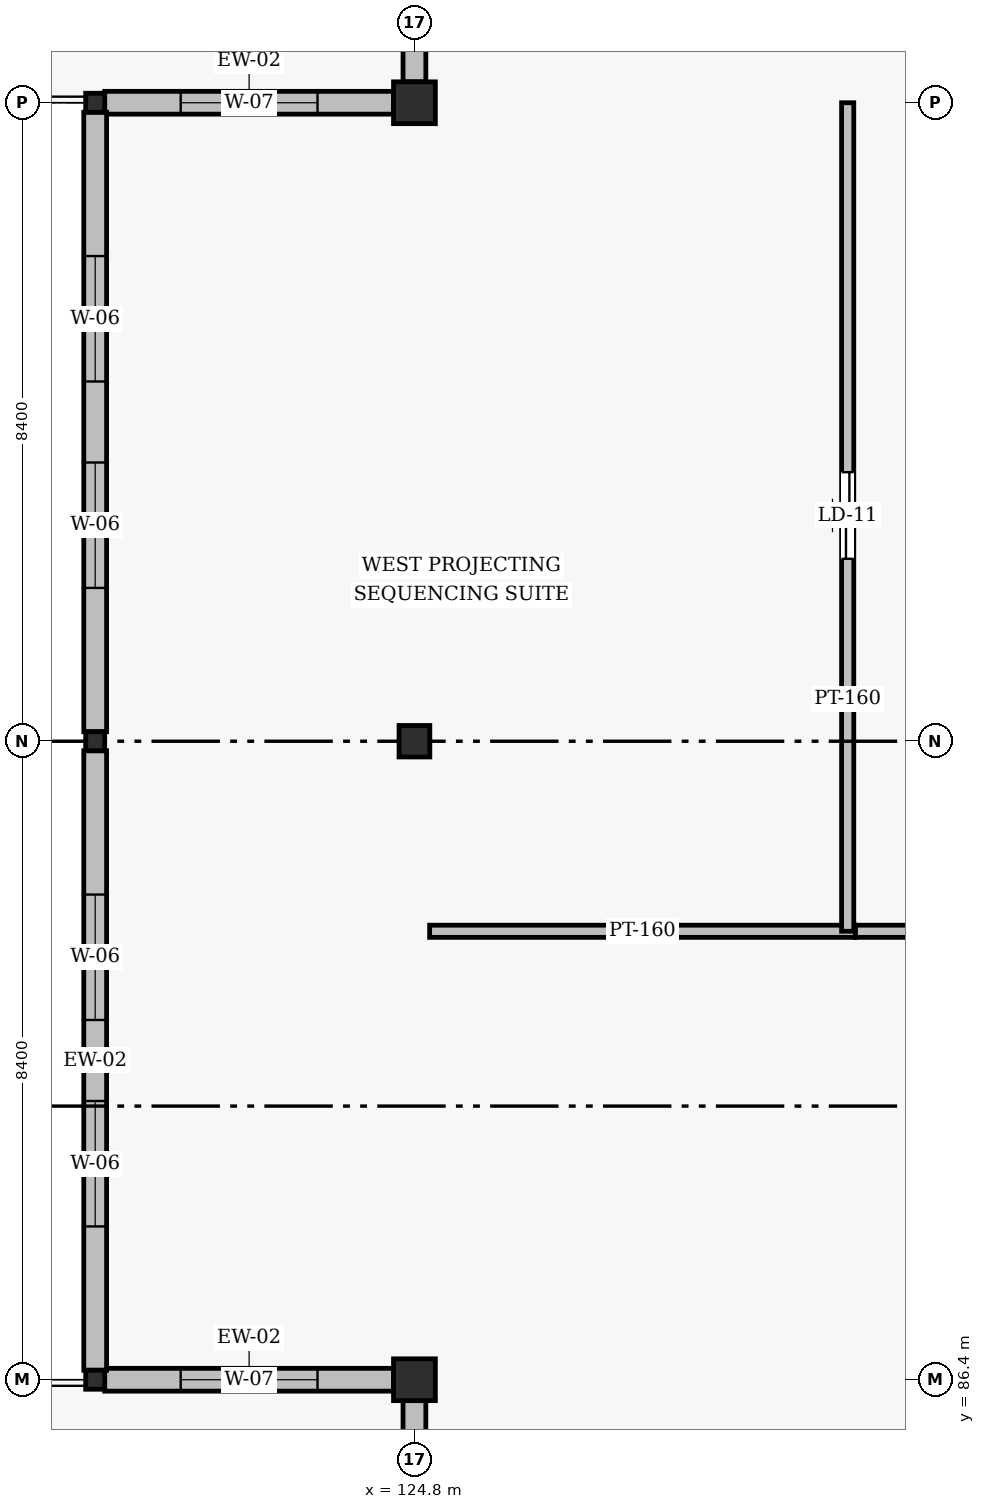
"""IFC4 building model, lengths in metres.
Left out: names, types, materials, properties, quantities, classifications, styles, units other than length and angle.
Written with IfcOpenShell. Run it as: python <this file> out.ifc"""

import sys

from ifc_helpers import new_model, si_unit, direction, frame, frame_2d, origin, origin_2d, place, context, subcontext, project, spatial, rectangle, hollow_rectangle, i_section, extrude, element, fill, save


model = new_model("IFC4")
c1 = context("Model", 3, precision=1e-05, world=origin(), true_north=direction((0.0, 1.0)))
c2 = subcontext(c1, "Body", "Model", "MODEL_VIEW")
j1 = project(units=[si_unit("LENGTHUNIT", "METRE"), si_unit("PLANEANGLEUNIT", "RADIAN")], contexts=[c1])
p1 = place(None, origin())
s1 = spatial("IfcSite", under=j1, at=p1, CompositionType="ELEMENT")
p2 = place(p1, origin())
s2 = spatial("IfcBuilding", under=s1, at=p2, CompositionType="ELEMENT")
p3 = place(p2, frame((0.0, 0.0, 21.0)))
s3 = spatial("IfcBuildingStorey", under=s2, at=p3, CompositionType="ELEMENT", Elevation=21.0)
for number, where, z_axis, x_axis in (
    (1, (120.6, 86.4, -0.3), (0.0, 0.0, 1.0), (1.0, 0.0, 0.0)),
    (2, (120.6, 94.8, -0.3), (0.0, 0.0, 1.0), (1.0, 0.0, 0.0)),
    (3, (120.6, 103.2, -0.3), (0.0, 0.0, 1.0), (1.0, 0.0, 0.0)),
):
    element("IfcColumn", number, at=place(p3, frame(where, z_axis=z_axis, x_axis=x_axis)), inside=s3, PredefinedType="COLUMN", context=c2, shape_type="SweptSolid", body=[
        extrude(i_section(OverallWidth=0.25, OverallDepth=0.25, WebThickness=0.009, FlangeThickness=0.014, FilletRadius=0.016, at=origin_2d()), origin(), (0.0, 0.0, 1.0), 3.9),
    ])
p4 = place(p3, frame((124.8, 86.4, 0.0), z_axis=(0.0, 0.0, 1.0), x_axis=(1.0, 0.0, 0.0)))
e4 = element("IfcColumn", 4, at=p4, inside=s3, PredefinedType="COLUMN", context=c2, shape_type="SweptSolid", body=[
    extrude(hollow_rectangle(XDim=0.55, YDim=0.55, WallThickness=0.022, InnerFilletRadius=0.022, OuterFilletRadius=0.044, at=origin_2d()), origin(), (0.0, 0.0, 1.0), 3.6),
])
p5 = place(p3, frame((124.8, 94.8, 0.0), z_axis=(0.0, 0.0, 1.0), x_axis=(1.0, 0.0, 0.0)))
e5 = element("IfcColumn", 5, at=p5, inside=s3, PredefinedType="COLUMN", context=c2, shape_type="SweptSolid", body=[
    extrude(i_section(OverallWidth=0.405, OverallDepth=0.414, WebThickness=0.018, FlangeThickness=0.028, FilletRadius=0.022, at=origin_2d()), origin(), (0.0, 0.0, 1.0), 3.6),
])
p6 = place(p3, frame((124.8, 103.2, 0.0), z_axis=(0.0, 0.0, 1.0), x_axis=(1.0, 0.0, 0.0)))
e6 = element("IfcColumn", 6, at=p6, inside=s3, PredefinedType="COLUMN", context=c2, shape_type="SweptSolid", body=[
    extrude(hollow_rectangle(XDim=0.55, YDim=0.55, WallThickness=0.022, InnerFilletRadius=0.022, OuterFilletRadius=0.044, at=origin_2d()), origin(), (0.0, 0.0, 1.0), 3.6),
])
p7 = place(p3, frame((120.725, 86.4, 0.0), z_axis=(0.0, 0.0, 1.0), x_axis=(1.0, 0.0, 0.0)))
e7 = element("IfcWall", 7, at=p7, inside=s3, PredefinedType="SOLIDWALL", context=c2, shape_type="SweptSolid", body=[
    extrude(rectangle(XDim=3.8, YDim=0.3, at=frame_2d((1.9, 0.0))), origin(), (0.0, 0.0, 1.0), 2.856),
])
p8 = place(p7, frame((1.0, 0.0, 0.85)))
e8 = element("IfcOpeningElement", 8, at=p8, cuts=e7, PredefinedType="OPENING", context=c2, shape_type="SweptSolid", body=[
    extrude(rectangle(XDim=1.8, YDim=1.71, at=frame_2d((0.9, 0.855))), frame((0.0, 0.16, 0.0), z_axis=(0.0, -1.0, 0.0), x_axis=(1.0, 0.0, 0.0)), (0.0, 0.0, 1.0), 0.32),
])
p9 = place(p3, frame((124.8, 86.125, 0.0), z_axis=(0.0, 0.0, 1.0), x_axis=(0.0, -1.0, 0.0)))
e9 = element("IfcWall", 9, at=p9, inside=s3, PredefinedType="SOLIDWALL", context=c2, shape_type="SweptSolid", body=[
    extrude(rectangle(XDim=7.85, YDim=0.3, at=frame_2d((3.925, 0.0))), origin(), (0.0, 0.0, 1.0), 2.85),
])
p10 = place(p9, frame((3.295, 0.0, 0.0)))
e10 = element("IfcOpeningElement", 10, at=p10, cuts=e9, PredefinedType="OPENING", context=c2, shape_type="SweptSolid", body=[
    extrude(rectangle(XDim=1.26, YDim=2.24, at=frame_2d((0.63, 1.12))), frame((0.0, 0.16, 0.0), z_axis=(0.0, -1.0, 0.0), x_axis=(1.0, 0.0, 0.0)), (0.0, 0.0, 1.0), 0.32),
])
p11 = place(p3, frame((124.8, 114.925, 0.0), z_axis=(0.0, 0.0, 1.0), x_axis=(0.0, -1.0, 0.0)))
e11 = element("IfcWall", 11, at=p11, inside=s3, PredefinedType="SOLIDWALL", context=c2, shape_type="SweptSolid", body=[
    extrude(rectangle(XDim=11.45, YDim=0.3, at=frame_2d((5.725, 0.0))), origin(), (0.0, 0.0, 1.0), 2.558),
])
p12 = place(p11, frame((5.095, 0.0, 0.0)))
e12 = element("IfcOpeningElement", 12, at=p12, cuts=e11, PredefinedType="OPENING", context=c2, shape_type="SweptSolid", body=[
    extrude(rectangle(XDim=1.26, YDim=2.24, at=frame_2d((0.63, 1.12))), frame((0.0, 0.16, 0.0), z_axis=(0.0, -1.0, 0.0), x_axis=(1.0, 0.0, 0.0)), (0.0, 0.0, 1.0), 0.32),
])
p13 = place(p3, frame((124.525, 103.2, 0.0), z_axis=(0.0, 0.0, 1.0), x_axis=(-1.0, 0.0, 0.0)))
e13 = element("IfcWall", 13, at=p13, inside=s3, PredefinedType="SOLIDWALL", context=c2, shape_type="SweptSolid", body=[
    extrude(rectangle(XDim=3.8, YDim=0.3, at=frame_2d((1.9, 0.0))), origin(), (0.0, 0.0, 1.0), 2.856),
])
p14 = place(p13, frame((1.0, 0.0, 0.85)))
e14 = element("IfcOpeningElement", 14, at=p14, cuts=e13, PredefinedType="OPENING", context=c2, shape_type="SweptSolid", body=[
    extrude(rectangle(XDim=1.8, YDim=1.71, at=frame_2d((0.9, 0.855))), frame((0.0, 0.16, 0.0), z_axis=(0.0, -1.0, 0.0), x_axis=(1.0, 0.0, 0.0)), (0.0, 0.0, 1.0), 0.32),
])
p15 = place(p3, frame((120.6, 103.075, 0.0), z_axis=(0.0, 0.0, 1.0), x_axis=(0.0, -1.0, 0.0)))
e15 = element("IfcWall", 15, at=p15, inside=s3, PredefinedType="SOLIDWALL", context=c2, shape_type="SweptSolid", body=[
    extrude(rectangle(XDim=8.15, YDim=0.3, at=frame_2d((4.075, 0.0))), origin(), (0.0, 0.0, 1.0), 2.85),
])
p16 = place(p15, frame((1.892, 0.0, 0.85)))
e16 = element("IfcOpeningElement", 16, at=p16, cuts=e15, PredefinedType="OPENING", context=c2, shape_type="SweptSolid", body=[
    extrude(rectangle(XDim=1.65, YDim=1.7, at=frame_2d((0.825, 0.85))), frame((0.0, 0.16, 0.0), z_axis=(0.0, -1.0, 0.0), x_axis=(1.0, 0.0, 0.0)), (0.0, 0.0, 1.0), 0.32),
])
p17 = place(p15, frame((4.608, 0.0, 0.85)))
e17 = element("IfcOpeningElement", 17, at=p17, cuts=e15, PredefinedType="OPENING", context=c2, shape_type="SweptSolid", body=[
    extrude(rectangle(XDim=1.65, YDim=1.7, at=frame_2d((0.825, 0.85))), frame((0.0, 0.16, 0.0), z_axis=(0.0, -1.0, 0.0), x_axis=(1.0, 0.0, 0.0)), (0.0, 0.0, 1.0), 0.32),
])
p18 = place(p3, frame((120.6, 94.675, 0.0), z_axis=(0.0, 0.0, 1.0), x_axis=(0.0, -1.0, 0.0)))
e18 = element("IfcWall", 18, at=p18, inside=s3, PredefinedType="SOLIDWALL", context=c2, shape_type="SweptSolid", body=[
    extrude(rectangle(XDim=8.15, YDim=0.3, at=frame_2d((4.075, 0.0))), origin(), (0.0, 0.0, 1.0), 2.85),
])
p19 = place(p18, frame((1.892, 0.0, 0.85)))
e19 = element("IfcOpeningElement", 19, at=p19, cuts=e18, PredefinedType="OPENING", context=c2, shape_type="SweptSolid", body=[
    extrude(rectangle(XDim=1.65, YDim=1.7, at=frame_2d((0.825, 0.85))), frame((0.0, 0.16, 0.0), z_axis=(0.0, -1.0, 0.0), x_axis=(1.0, 0.0, 0.0)), (0.0, 0.0, 1.0), 0.32),
])
p20 = place(p18, frame((4.608, 0.0, 0.85)))
e20 = element("IfcOpeningElement", 20, at=p20, cuts=e18, PredefinedType="OPENING", context=c2, shape_type="SweptSolid", body=[
    extrude(rectangle(XDim=1.65, YDim=1.7, at=frame_2d((0.825, 0.85))), frame((0.0, 0.16, 0.0), z_axis=(0.0, -1.0, 0.0), x_axis=(1.0, 0.0, 0.0)), (0.0, 0.0, 1.0), 0.32),
])
p21 = place(p3, frame((130.6, 92.3, 0.0), z_axis=(0.0, 0.0, 1.0), x_axis=(1.0, 0.0, 0.0)))
e21 = element("IfcWall", 21, at=p21, inside=s3, PredefinedType="PARTITIONING", context=c2, shape_type="SweptSolid", body=[
    extrude(rectangle(XDim=11.4, YDim=0.16, at=frame_2d((5.7, 0.0))), origin(), (0.0, 0.0, 1.0), 2.85),
])
p22 = place(p21, frame((5.1, 0.0, 0.0)))
e22 = element("IfcOpeningElement", 22, at=p22, cuts=e21, PredefinedType="OPENING", context=c2, shape_type="SweptSolid", body=[
    extrude(rectangle(XDim=1.25, YDim=2.12, at=frame_2d((0.625, 1.06))), frame((0.0, 0.09, 0.0), z_axis=(0.0, -1.0, 0.0), x_axis=(1.0, 0.0, 0.0)), (0.0, 0.0, 1.0), 0.18),
])
p23 = place(p3, frame((125.0, 92.3, 0.0), z_axis=(0.0, 0.0, 1.0), x_axis=(1.0, 0.0, 0.0)))
e23 = element("IfcWall", 23, at=p23, inside=s3, PredefinedType="PARTITIONING", context=c2, shape_type="SweptSolid", body=[
    extrude(rectangle(XDim=5.6, YDim=0.16, at=frame_2d((2.8, 0.0))), origin(), (0.0, 0.0, 1.0), 3.35),
])
p24 = place(p3, frame((130.5, 92.3, 0.0), z_axis=(0.0, 0.0, 1.0), x_axis=(0.0, 1.0, 0.0)))
e24 = element("IfcWall", 24, at=p24, inside=s3, PredefinedType="PARTITIONING", context=c2, shape_type="SweptSolid", body=[
    extrude(rectangle(XDim=10.9, YDim=0.16, at=frame_2d((5.45, 0.0))), origin(), (0.0, 0.0, 1.0), 2.854),
])
p25 = place(p24, frame((4.9, 0.0, 0.0)))
e25 = element("IfcOpeningElement", 25, at=p25, cuts=e24, PredefinedType="OPENING", context=c2, shape_type="SweptSolid", body=[
    extrude(rectangle(XDim=1.14, YDim=2.12, at=frame_2d((0.57, 1.06))), frame((0.0, 0.09, 0.0), z_axis=(0.0, -1.0, 0.0), x_axis=(1.0, 0.0, 0.0)), (0.0, 0.0, 1.0), 0.18),
])
p26 = place(p8, origin())
e26 = element("IfcWindow", 26, at=p26, inside=s3, PartitioningType="SINGLE_PANEL", PredefinedType="WINDOW", context=c2, shape_type="SweptSolid", body=[
    extrude(rectangle(XDim=1.8, YDim=1.71, at=frame_2d((0.9, 0.855))), frame((0.0, 0.03, 0.0), z_axis=(0.0, -1.0, 0.0), x_axis=(1.0, 0.0, 0.0)), (0.0, 0.0, 1.0), 0.06),
])
fill(e8, e26)
p27 = place(p14, origin())
e27 = element("IfcWindow", 27, at=p27, inside=s3, PartitioningType="SINGLE_PANEL", PredefinedType="WINDOW", context=c2, shape_type="SweptSolid", body=[
    extrude(rectangle(XDim=1.8, YDim=1.71, at=frame_2d((0.9, 0.855))), frame((0.0, 0.03, 0.0), z_axis=(0.0, -1.0, 0.0), x_axis=(1.0, 0.0, 0.0)), (0.0, 0.0, 1.0), 0.06),
])
fill(e14, e27)
p28 = place(p16, origin())
e28 = element("IfcWindow", 28, at=p28, inside=s3, PartitioningType="SINGLE_PANEL", PredefinedType="WINDOW", context=c2, shape_type="SweptSolid", body=[
    extrude(rectangle(XDim=1.65, YDim=1.7, at=frame_2d((0.825, 0.85))), frame((0.0, 0.03, 0.0), z_axis=(0.0, -1.0, 0.0), x_axis=(1.0, 0.0, 0.0)), (0.0, 0.0, 1.0), 0.06),
])
fill(e16, e28)
p29 = place(p17, origin())
e29 = element("IfcWindow", 29, at=p29, inside=s3, PartitioningType="SINGLE_PANEL", PredefinedType="WINDOW", context=c2, shape_type="SweptSolid", body=[
    extrude(rectangle(XDim=1.65, YDim=1.7, at=frame_2d((0.825, 0.85))), frame((0.0, 0.03, 0.0), z_axis=(0.0, -1.0, 0.0), x_axis=(1.0, 0.0, 0.0)), (0.0, 0.0, 1.0), 0.06),
])
fill(e17, e29)
p30 = place(p19, origin())
e30 = element("IfcWindow", 30, at=p30, inside=s3, PartitioningType="SINGLE_PANEL", PredefinedType="WINDOW", context=c2, shape_type="SweptSolid", body=[
    extrude(rectangle(XDim=1.65, YDim=1.7, at=frame_2d((0.825, 0.85))), frame((0.0, 0.03, 0.0), z_axis=(0.0, -1.0, 0.0), x_axis=(1.0, 0.0, 0.0)), (0.0, 0.0, 1.0), 0.06),
])
fill(e19, e30)
p31 = place(p20, origin())
e31 = element("IfcWindow", 31, at=p31, inside=s3, PartitioningType="SINGLE_PANEL", PredefinedType="WINDOW", context=c2, shape_type="SweptSolid", body=[
    extrude(rectangle(XDim=1.65, YDim=1.7, at=frame_2d((0.825, 0.85))), frame((0.0, 0.03, 0.0), z_axis=(0.0, -1.0, 0.0), x_axis=(1.0, 0.0, 0.0)), (0.0, 0.0, 1.0), 0.06),
])
fill(e20, e31)
p32 = place(p25, origin())
e32 = element("IfcDoor", 32, at=p32, inside=s3, OperationType="SINGLE_SWING_RIGHT", PredefinedType="DOOR", context=c2, shape_type="SweptSolid", body=[
    extrude(rectangle(XDim=1.14, YDim=2.12, at=frame_2d((0.57, 1.06))), frame((0.0, 0.025, 0.0), z_axis=(0.0, -1.0, 0.0), x_axis=(1.0, 0.0, 0.0)), (0.0, 0.0, 1.0), 0.05),
])
fill(e25, e32)
save(model, sys.argv[1])
